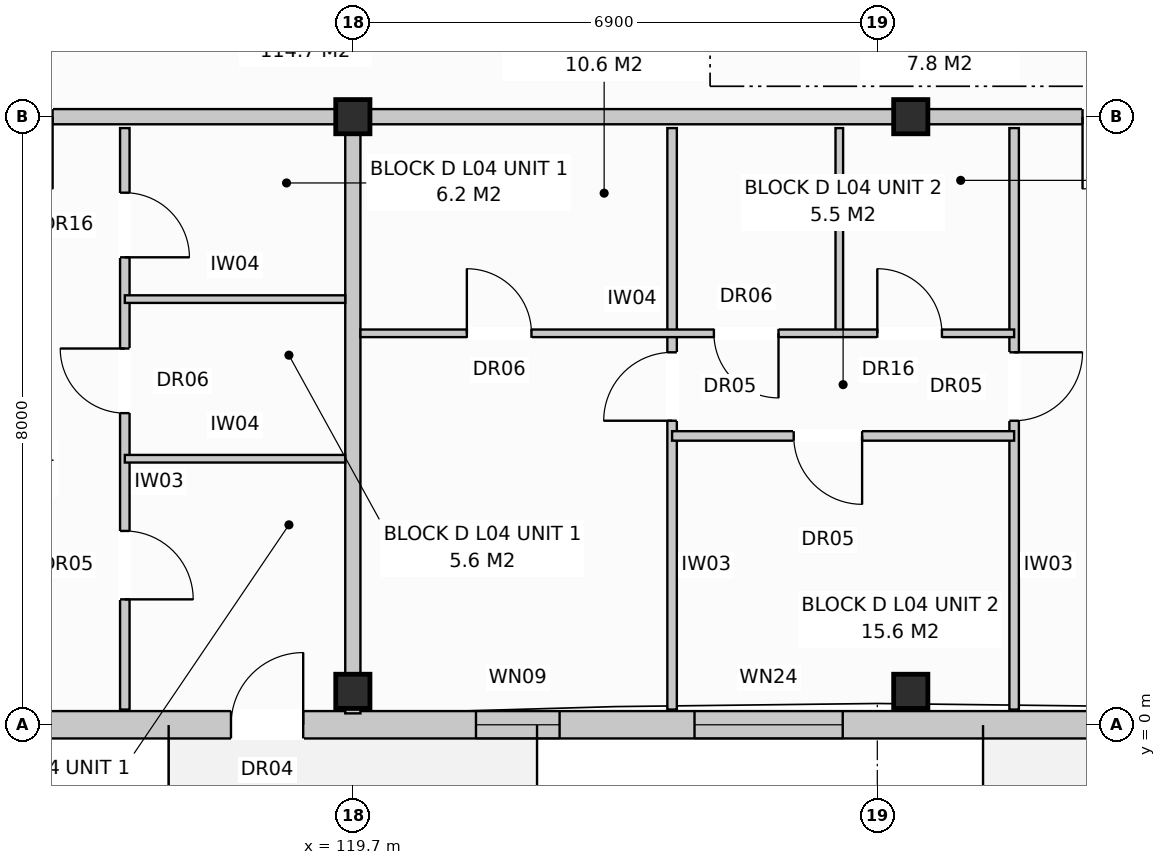
"""IFC4 building model, lengths in metres.
Left out: names, types, materials, properties, quantities, classifications, styles, units other than length and angle.
Written with IfcOpenShell. Run it as: python <this file> out.ifc"""

import sys

from ifc_helpers import new_model, si_unit, direction, frame, frame_2d, origin, origin_with_axes, origin_2d, place, context, subcontext, project, spatial, rectangle, extrude, element, fill, save


model = new_model("IFC4")
c1 = context("Model", 3, precision=1e-05, world=origin(), true_north=direction((0.0, 1.0)))
c2 = subcontext(c1, "Body", "Model", "MODEL_VIEW")
j1 = project(units=[si_unit("LENGTHUNIT", "METRE"), si_unit("PLANEANGLEUNIT", "RADIAN")], contexts=[c1])
p1 = place(None, origin())
s1 = spatial("IfcSite", under=j1, at=p1, CompositionType="ELEMENT")
p2 = place(p1, origin())
s2 = spatial("IfcBuilding", under=s1, at=p2, CompositionType="ELEMENT")
p3 = place(p2, frame((0.0, 0.0, 14.4)))
s3 = spatial("IfcBuildingStorey", under=s2, at=p3, CompositionType="ELEMENT", Elevation=14.4)
for number, where, z_axis, x_axis in (
    (1, (119.7, 0.44, 0.0), (0.0, 0.0, 1.0), (1.0, 0.0, 0.0)),
    (2, (119.7, 8.0, 0.0), (0.0, 0.0, 1.0), (1.0, 0.0, 0.0)),
    (3, (127.04, 0.44, 0.0), (0.0, 0.0, 1.0), (1.0, 0.0, 0.0)),
    (4, (127.04, 8.0, 0.0), (0.0, 0.0, 1.0), (1.0, 0.0, 0.0)),
):
    element("IfcColumn", number, at=place(p3, frame(where, z_axis=z_axis, x_axis=x_axis)), inside=s3, PredefinedType="COLUMN", context=c2, shape_type="SweptSolid", body=[
        extrude(rectangle(XDim=0.45, YDim=0.45, at=origin_2d()), origin(), (0.0, 0.0, 1.0), 3.2),
    ])
p4 = place(p3, frame((112.97, 0.0, 0.0), z_axis=(0.0, 0.0, 1.0), x_axis=(1.0, 0.0, 0.0)))
e5 = element("IfcWall", 5, at=p4, inside=s3, PredefinedType="STANDARD", context=c2, shape_type="SweptSolid", body=[
    extrude(rectangle(XDim=54.86, YDim=0.36, at=frame_2d((27.43, 0.0))), origin(), (0.0, 0.0, 1.0), 2.94),
])
p5 = place(p4, frame((5.127, 0.0, 0.0)))
e6 = element("IfcOpeningElement", 6, at=p5, cuts=e5, PredefinedType="OPENING", context=c2, shape_type="SweptSolid", body=[
    extrude(rectangle(XDim=0.95, YDim=2.1, at=frame_2d((0.475, 1.05))), frame((0.0, 0.192, 0.0), z_axis=(0.0, -1.0, 0.0), x_axis=(1.0, 0.0, 0.0)), (0.0, 0.0, 1.0), 0.384),
])
p6 = place(p4, frame((18.9, 0.0, 0.0)))
e7 = element("IfcOpeningElement", 7, at=p6, cuts=e5, PredefinedType="OPENING", context=c2, shape_type="SweptSolid", body=[
    extrude(rectangle(XDim=0.95, YDim=2.1, at=frame_2d((0.475, 1.05))), frame((0.0, 0.192, 0.0), z_axis=(0.0, -1.0, 0.0), x_axis=(1.0, 0.0, 0.0)), (0.0, 0.0, 1.0), 0.384),
])
p7 = place(p4, frame((32.7, 0.0, 0.0)))
e8 = element("IfcOpeningElement", 8, at=p7, cuts=e5, PredefinedType="OPENING", context=c2, shape_type="SweptSolid", body=[
    extrude(rectangle(XDim=0.95, YDim=2.1, at=frame_2d((0.475, 1.05))), frame((0.0, 0.192, 0.0), z_axis=(0.0, -1.0, 0.0), x_axis=(1.0, 0.0, 0.0)), (0.0, 0.0, 1.0), 0.384),
])
p8 = place(p4, frame((44.591, 0.0, 0.0)))
e9 = element("IfcOpeningElement", 9, at=p8, cuts=e5, PredefinedType="OPENING", context=c2, shape_type="SweptSolid", body=[
    extrude(rectangle(XDim=0.95, YDim=2.1, at=frame_2d((0.475, 1.05))), frame((0.0, 0.192, 0.0), z_axis=(0.0, -1.0, 0.0), x_axis=(1.0, 0.0, 0.0)), (0.0, 0.0, 1.0), 0.384),
])
p9 = place(p4, frame((0.9, 0.0, 0.8)))
e10 = element("IfcOpeningElement", 10, at=p9, cuts=e5, PredefinedType="OPENING", context=c2, shape_type="SweptSolid", body=[
    extrude(rectangle(XDim=1.8, YDim=1.7, at=frame_2d((0.9, 0.85))), frame((0.0, 0.192, 0.0), z_axis=(0.0, -1.0, 0.0), x_axis=(1.0, 0.0, 0.0)), (0.0, 0.0, 1.0), 0.384),
])
p10 = place(p4, frame((8.35, 0.0, 0.72)))
e11 = element("IfcOpeningElement", 11, at=p10, cuts=e5, PredefinedType="OPENING", context=c2, shape_type="SweptSolid", body=[
    extrude(rectangle(XDim=1.1, YDim=1.5, at=frame_2d((0.55, 0.75))), frame((0.0, 0.192, 0.0), z_axis=(0.0, -1.0, 0.0), x_axis=(1.0, 0.0, 0.0)), (0.0, 0.0, 1.0), 0.384),
])
p11 = place(p4, frame((11.225, 0.0, 0.8)))
e12 = element("IfcOpeningElement", 12, at=p11, cuts=e5, PredefinedType="OPENING", context=c2, shape_type="SweptSolid", body=[
    extrude(rectangle(XDim=1.95, YDim=1.65, at=frame_2d((0.975, 0.825))), frame((0.0, 0.192, 0.0), z_axis=(0.0, -1.0, 0.0), x_axis=(1.0, 0.0, 0.0)), (0.0, 0.0, 1.0), 0.384),
])
p12 = place(p4, frame((16.8, 0.0, 0.8)))
e13 = element("IfcOpeningElement", 13, at=p12, cuts=e5, PredefinedType="OPENING", context=c2, shape_type="SweptSolid", body=[
    extrude(rectangle(XDim=1.8, YDim=1.7, at=frame_2d((0.9, 0.85))), frame((0.0, 0.192, 0.0), z_axis=(0.0, -1.0, 0.0), x_axis=(1.0, 0.0, 0.0)), (0.0, 0.0, 1.0), 0.384),
])
p13 = place(p4, frame((22.25, 0.0, 0.72)))
e14 = element("IfcOpeningElement", 14, at=p13, cuts=e5, PredefinedType="OPENING", context=c2, shape_type="SweptSolid", body=[
    extrude(rectangle(XDim=1.9, YDim=1.85, at=frame_2d((0.95, 0.925))), frame((0.0, 0.192, 0.0), z_axis=(0.0, -1.0, 0.0), x_axis=(1.0, 0.0, 0.0)), (0.0, 0.0, 1.0), 0.384),
])
p14 = place(p4, frame((28.35, 0.0, 0.72)))
e15 = element("IfcOpeningElement", 15, at=p14, cuts=e5, PredefinedType="OPENING", context=c2, shape_type="SweptSolid", body=[
    extrude(rectangle(XDim=1.1, YDim=1.5, at=frame_2d((0.55, 0.75))), frame((0.0, 0.192, 0.0), z_axis=(0.0, -1.0, 0.0), x_axis=(1.0, 0.0, 0.0)), (0.0, 0.0, 1.0), 0.384),
])
p15 = place(p4, frame((30.6, 0.0, 0.8)))
e16 = element("IfcOpeningElement", 16, at=p15, cuts=e5, PredefinedType="OPENING", context=c2, shape_type="SweptSolid", body=[
    extrude(rectangle(XDim=1.8, YDim=1.7, at=frame_2d((0.9, 0.85))), frame((0.0, 0.192, 0.0), z_axis=(0.0, -1.0, 0.0), x_axis=(1.0, 0.0, 0.0)), (0.0, 0.0, 1.0), 0.384),
])
p16 = place(p4, frame((36.55, 0.0, 0.8)))
e17 = element("IfcOpeningElement", 17, at=p16, cuts=e5, PredefinedType="OPENING", context=c2, shape_type="SweptSolid", body=[
    extrude(rectangle(XDim=1.9, YDim=1.85, at=frame_2d((0.95, 0.925))), frame((0.0, 0.192, 0.0), z_axis=(0.0, -1.0, 0.0), x_axis=(1.0, 0.0, 0.0)), (0.0, 0.0, 1.0), 0.384),
])
p17 = place(p4, frame((42.65, 0.0, 0.72)))
e18 = element("IfcOpeningElement", 18, at=p17, cuts=e5, PredefinedType="OPENING", context=c2, shape_type="SweptSolid", body=[
    extrude(rectangle(XDim=1.1, YDim=1.5, at=frame_2d((0.55, 0.75))), frame((0.0, 0.192, 0.0), z_axis=(0.0, -1.0, 0.0), x_axis=(1.0, 0.0, 0.0)), (0.0, 0.0, 1.0), 0.384),
])
p18 = place(p4, frame((48.7, 0.0, 0.8)))
e19 = element("IfcOpeningElement", 19, at=p18, cuts=e5, PredefinedType="OPENING", context=c2, shape_type="SweptSolid", body=[
    extrude(rectangle(XDim=1.8, YDim=1.7, at=frame_2d((0.9, 0.85))), frame((0.0, 0.192, 0.0), z_axis=(0.0, -1.0, 0.0), x_axis=(1.0, 0.0, 0.0)), (0.0, 0.0, 1.0), 0.384),
])
p19 = place(p4, frame((52.45, 0.0, 0.72)))
e20 = element("IfcOpeningElement", 20, at=p19, cuts=e5, PredefinedType="OPENING", context=c2, shape_type="SweptSolid", body=[
    extrude(rectangle(XDim=1.1, YDim=1.5, at=frame_2d((0.55, 0.75))), frame((0.0, 0.192, 0.0), z_axis=(0.0, -1.0, 0.0), x_axis=(1.0, 0.0, 0.0)), (0.0, 0.0, 1.0), 0.384),
])
p20 = place(p3, frame((119.7, 7.85, 0.0), z_axis=(0.0, 0.0, 1.0), x_axis=(0.0, -1.0, 0.0)))
e21 = element("IfcWall", 21, at=p20, inside=s3, PredefinedType="PARTITIONING", context=c2, shape_type="SweptSolid", body=[
    extrude(rectangle(XDim=7.7, YDim=0.2, at=frame_2d((3.85, 0.0))), origin(), (0.0, 0.0, 1.0), 2.38),
])
p21 = place(p3, frame((112.8, 8.0, 0.0), z_axis=(0.0, 0.0, 1.0), x_axis=(1.0, 0.0, 0.0)))
e22 = element("IfcWall", 22, at=p21, inside=s3, PredefinedType="PARTITIONING", context=c2, shape_type="SweptSolid", body=[
    extrude(rectangle(XDim=6.9, YDim=0.2, at=frame_2d((3.45, 0.0))), origin(), (0.0, 0.0, 1.0), 2.38),
])
p22 = place(p21, frame((2.0, 0.0, 0.0)))
e23 = element("IfcOpeningElement", 23, at=p22, cuts=e22, PredefinedType="OPENING", context=c2, shape_type="SweptSolid", body=[
    extrude(rectangle(XDim=0.95, YDim=2.15, at=frame_2d((0.475, 1.075))), frame((0.0, 0.112, 0.0), z_axis=(0.0, -1.0, 0.0), x_axis=(1.0, 0.0, 0.0)), (0.0, 0.0, 1.0), 0.224),
])
p23 = place(p3, frame((116.7, 7.85, 0.0), z_axis=(0.0, 0.0, 1.0), x_axis=(0.0, -1.0, 0.0)))
e24 = element("IfcWall", 24, at=p23, inside=s3, PredefinedType="PARTITIONING", context=c2, shape_type="SweptSolid", body=[
    extrude(rectangle(XDim=7.65, YDim=0.125, at=frame_2d((3.825, 0.0))), origin(), (0.0, 0.0, 1.0), 2.94),
])
p24 = place(p23, frame((0.85, 0.0, 0.0)))
e25 = element("IfcOpeningElement", 25, at=p24, cuts=e24, PredefinedType="OPENING", context=c2, shape_type="SweptSolid", body=[
    extrude(rectangle(XDim=0.85, YDim=2.1, at=frame_2d((0.425, 1.05))), frame((0.0, 0.074, 0.0), z_axis=(0.0, -1.0, 0.0), x_axis=(1.0, 0.0, 0.0)), (0.0, 0.0, 1.0), 0.149),
])
p25 = place(p23, frame((2.9, 0.0, 0.0)))
e26 = element("IfcOpeningElement", 26, at=p25, cuts=e24, PredefinedType="OPENING", context=c2, shape_type="SweptSolid", body=[
    extrude(rectangle(XDim=0.85, YDim=2.05, at=frame_2d((0.425, 1.025))), frame((0.0, 0.074, 0.0), z_axis=(0.0, -1.0, 0.0), x_axis=(1.0, 0.0, 0.0)), (0.0, 0.0, 1.0), 0.149),
])
p26 = place(p23, frame((5.3, 0.0, 0.0)))
e27 = element("IfcOpeningElement", 27, at=p26, cuts=e24, PredefinedType="OPENING", context=c2, shape_type="SweptSolid", body=[
    extrude(rectangle(XDim=0.9, YDim=2.1, at=frame_2d((0.45, 1.05))), frame((0.0, 0.074, 0.0), z_axis=(0.0, -1.0, 0.0), x_axis=(1.0, 0.0, 0.0)), (0.0, 0.0, 1.0), 0.149),
])
for number, where, z_axis, x_axis in (
    (28, (116.7, 5.6, 0.0), (0.0, 0.0, 1.0), (1.0, 0.0, 0.0)),
    (29, (116.7, 3.5, 0.0), (0.0, 0.0, 1.0), (1.0, 0.0, 0.0)),
):
    element("IfcWall", number, at=place(p3, frame(where, z_axis=z_axis, x_axis=x_axis)), inside=s3, PredefinedType="PARTITIONING", context=c2, shape_type="SweptSolid", body=[
        extrude(rectangle(XDim=2.9, YDim=0.1, at=frame_2d((1.45, 0.0))), origin(), (0.0, 0.0, 1.0), 2.94),
    ])
p27 = place(p3, frame((119.7, 8.0, 0.0), z_axis=(0.0, 0.0, 1.0), x_axis=(1.0, 0.0, 0.0)))
e30 = element("IfcWall", 30, at=p27, inside=s3, PredefinedType="PARTITIONING", context=c2, shape_type="SweptSolid", body=[
    extrude(rectangle(XDim=13.8, YDim=0.2, at=frame_2d((6.9, 0.0))), origin(), (0.0, 0.0, 1.0), 2.38),
])
p28 = place(p27, frame((9.6, 0.0, 0.0)))
e31 = element("IfcOpeningElement", 31, at=p28, cuts=e30, PredefinedType="OPENING", context=c2, shape_type="SweptSolid", body=[
    extrude(rectangle(XDim=0.95, YDim=2.15, at=frame_2d((0.475, 1.075))), frame((0.0, 0.112, 0.0), z_axis=(0.0, -1.0, 0.0), x_axis=(1.0, 0.0, 0.0)), (0.0, 0.0, 1.0), 0.224),
])
p29 = place(p3, frame((128.4, 7.85, 0.0), z_axis=(0.0, 0.0, 1.0), x_axis=(0.0, -1.0, 0.0)))
e32 = element("IfcWall", 32, at=p29, inside=s3, PredefinedType="PARTITIONING", context=c2, shape_type="SweptSolid", body=[
    extrude(rectangle(XDim=7.65, YDim=0.125, at=frame_2d((3.825, 0.0))), origin(), (0.0, 0.0, 1.0), 2.94),
])
p30 = place(p29, frame((2.95, 0.0, 0.0)))
e33 = element("IfcOpeningElement", 33, at=p30, cuts=e32, PredefinedType="OPENING", context=c2, shape_type="SweptSolid", body=[
    extrude(rectangle(XDim=0.9, YDim=2.1, at=frame_2d((0.45, 1.05))), frame((0.0, 0.074, 0.0), z_axis=(0.0, -1.0, 0.0), x_axis=(1.0, 0.0, 0.0)), (0.0, 0.0, 1.0), 0.149),
])
p31 = place(p3, frame((123.9, 7.85, 0.0), z_axis=(0.0, 0.0, 1.0), x_axis=(0.0, -1.0, 0.0)))
e34 = element("IfcWall", 34, at=p31, inside=s3, PredefinedType="PARTITIONING", context=c2, shape_type="SweptSolid", body=[
    extrude(rectangle(XDim=7.65, YDim=0.125, at=frame_2d((3.825, 0.0))), origin(), (0.0, 0.0, 1.0), 2.94),
])
p32 = place(p31, frame((2.95, 0.0, 0.0)))
e35 = element("IfcOpeningElement", 35, at=p32, cuts=e34, PredefinedType="OPENING", context=c2, shape_type="SweptSolid", body=[
    extrude(rectangle(XDim=0.9, YDim=2.1, at=frame_2d((0.45, 1.05))), frame((0.0, 0.074, 0.0), z_axis=(0.0, -1.0, 0.0), x_axis=(1.0, 0.0, 0.0)), (0.0, 0.0, 1.0), 0.149),
])
p33 = place(p3, frame((126.1, 7.85, 0.0), z_axis=(0.0, 0.0, 1.0), x_axis=(0.0, -1.0, 0.0)))
e36 = element("IfcWall", 36, at=p33, inside=s3, PredefinedType="PARTITIONING", context=c2, shape_type="SweptSolid", body=[
    extrude(rectangle(XDim=2.7, YDim=0.1, at=frame_2d((1.35, 0.0))), origin(), (0.0, 0.0, 1.0), 2.94),
])
p34 = place(p3, frame((119.8, 5.15, 0.0), z_axis=(0.0, 0.0, 1.0), x_axis=(1.0, 0.0, 0.0)))
e37 = element("IfcWall", 37, at=p34, inside=s3, PredefinedType="PARTITIONING", context=c2, shape_type="SweptSolid", body=[
    extrude(rectangle(XDim=8.6, YDim=0.1, at=frame_2d((4.3, 0.0))), origin(), (0.0, 0.0, 1.0), 2.94),
])
p35 = place(p34, frame((1.4, 0.0, 0.0)))
e38 = element("IfcOpeningElement", 38, at=p35, cuts=e37, PredefinedType="OPENING", context=c2, shape_type="SweptSolid", body=[
    extrude(rectangle(XDim=0.85, YDim=2.05, at=frame_2d((0.425, 1.025))), frame((0.0, 0.062, 0.0), z_axis=(0.0, -1.0, 0.0), x_axis=(1.0, 0.0, 0.0)), (0.0, 0.0, 1.0), 0.124),
])
p36 = place(p34, frame((4.65, 0.0, 0.0)))
e39 = element("IfcOpeningElement", 39, at=p36, cuts=e37, PredefinedType="OPENING", context=c2, shape_type="SweptSolid", body=[
    extrude(rectangle(XDim=0.85, YDim=2.05, at=frame_2d((0.425, 1.025))), frame((0.0, 0.062, 0.0), z_axis=(0.0, -1.0, 0.0), x_axis=(1.0, 0.0, 0.0)), (0.0, 0.0, 1.0), 0.124),
])
p37 = place(p34, frame((6.8, 0.0, 0.0)))
e40 = element("IfcOpeningElement", 40, at=p37, cuts=e37, PredefinedType="OPENING", context=c2, shape_type="SweptSolid", body=[
    extrude(rectangle(XDim=0.85, YDim=2.1, at=frame_2d((0.425, 1.05))), frame((0.0, 0.062, 0.0), z_axis=(0.0, -1.0, 0.0), x_axis=(1.0, 0.0, 0.0)), (0.0, 0.0, 1.0), 0.124),
])
p38 = place(p3, frame((123.9, 3.8, 0.0), z_axis=(0.0, 0.0, 1.0), x_axis=(1.0, 0.0, 0.0)))
e41 = element("IfcWall", 41, at=p38, inside=s3, PredefinedType="PARTITIONING", context=c2, shape_type="SweptSolid", body=[
    extrude(rectangle(XDim=4.5, YDim=0.125, at=frame_2d((2.25, 0.0))), origin(), (0.0, 0.0, 1.0), 2.94),
])
p39 = place(p38, frame((1.6, 0.0, 0.0)))
e42 = element("IfcOpeningElement", 42, at=p39, cuts=e41, PredefinedType="OPENING", context=c2, shape_type="SweptSolid", body=[
    extrude(rectangle(XDim=0.9, YDim=2.1, at=frame_2d((0.45, 1.05))), frame((0.0, 0.074, 0.0), z_axis=(0.0, -1.0, 0.0), x_axis=(1.0, 0.0, 0.0)), (0.0, 0.0, 1.0), 0.149),
])
p40 = place(p5, origin_with_axes())
e43 = element("IfcDoor", 43, at=p40, inside=s3, OperationType="SINGLE_SWING_RIGHT", PredefinedType="DOOR", context=c2, shape_type="SweptSolid", body=[
    extrude(rectangle(XDim=0.95, YDim=2.1, at=frame_2d((0.475, 1.05))), frame((0.0, 0.025, 0.0), z_axis=(0.0, -1.0, 0.0), x_axis=(1.0, 0.0, 0.0)), (0.0, 0.0, 1.0), 0.05),
])
fill(e6, e43)
p41 = place(p10, origin_with_axes())
e44 = element("IfcWindow", 44, at=p41, inside=s3, PartitioningType="SINGLE_PANEL", PredefinedType="WINDOW", context=c2, shape_type="SweptSolid", body=[
    extrude(rectangle(XDim=1.1, YDim=1.5, at=frame_2d((0.55, 0.75))), frame((0.0, 0.03, 0.0), z_axis=(0.0, -1.0, 0.0), x_axis=(1.0, 0.0, 0.0)), (0.0, 0.0, 1.0), 0.06),
])
fill(e11, e44)
p42 = place(p11, origin_with_axes())
e45 = element("IfcWindow", 45, at=p42, inside=s3, PartitioningType="SINGLE_PANEL", PredefinedType="WINDOW", context=c2, shape_type="SweptSolid", body=[
    extrude(rectangle(XDim=1.95, YDim=1.65, at=frame_2d((0.975, 0.825))), frame((0.0, 0.03, 0.0), z_axis=(0.0, -1.0, 0.0), x_axis=(1.0, 0.0, 0.0)), (0.0, 0.0, 1.0), 0.06),
])
fill(e12, e45)
p43 = place(p24, origin_with_axes())
e46 = element("IfcDoor", 46, at=p43, inside=s3, OperationType="SINGLE_SWING_RIGHT", PredefinedType="DOOR", context=c2, shape_type="SweptSolid", body=[
    extrude(rectangle(XDim=0.85, YDim=2.1, at=frame_2d((0.425, 1.05))), frame((0.0, 0.025, 0.0), z_axis=(0.0, -1.0, 0.0), x_axis=(1.0, 0.0, 0.0)), (0.0, 0.0, 1.0), 0.05),
])
fill(e25, e46)
p44 = place(p25, frame((0.85, 0.0, 0.0), z_axis=(0.0, 0.0, 1.0), x_axis=(-1.0, 0.0, 0.0)))
e47 = element("IfcDoor", 47, at=p44, inside=s3, OperationType="SINGLE_SWING_LEFT", PredefinedType="DOOR", context=c2, shape_type="SweptSolid", body=[
    extrude(rectangle(XDim=0.85, YDim=2.05, at=frame_2d((0.425, 1.025))), frame((0.0, 0.025, 0.0), z_axis=(0.0, -1.0, 0.0), x_axis=(1.0, 0.0, 0.0)), (0.0, 0.0, 1.0), 0.05),
])
fill(e26, e47)
p45 = place(p26, origin_with_axes())
e48 = element("IfcDoor", 48, at=p45, inside=s3, OperationType="SINGLE_SWING_RIGHT", PredefinedType="DOOR", context=c2, shape_type="SweptSolid", body=[
    extrude(rectangle(XDim=0.9, YDim=2.1, at=frame_2d((0.45, 1.05))), frame((0.0, 0.025, 0.0), z_axis=(0.0, -1.0, 0.0), x_axis=(1.0, 0.0, 0.0)), (0.0, 0.0, 1.0), 0.05),
])
fill(e27, e48)
p46 = place(p28, frame((0.95, 0.0, 0.0), z_axis=(0.0, 0.0, 1.0), x_axis=(-1.0, 0.0, 0.0)))
e49 = element("IfcDoor", 49, at=p46, inside=s3, OperationType="SINGLE_SWING_LEFT", PredefinedType="DOOR", context=c2, shape_type="SweptSolid", body=[
    extrude(rectangle(XDim=0.95, YDim=2.15, at=frame_2d((0.475, 1.075))), frame((0.0, 0.025, 0.0), z_axis=(0.0, -1.0, 0.0), x_axis=(1.0, 0.0, 0.0)), (0.0, 0.0, 1.0), 0.05),
])
fill(e31, e49)
p47 = place(p30, origin_with_axes())
e50 = element("IfcDoor", 50, at=p47, inside=s3, OperationType="SINGLE_SWING_LEFT", PredefinedType="DOOR", context=c2, shape_type="SweptSolid", body=[
    extrude(rectangle(XDim=0.9, YDim=2.1, at=frame_2d((0.45, 1.05))), frame((0.0, 0.025, 0.0), z_axis=(0.0, -1.0, 0.0), x_axis=(1.0, 0.0, 0.0)), (0.0, 0.0, 1.0), 0.05),
])
fill(e33, e50)
p48 = place(p32, frame((0.9, 0.0, 0.0), z_axis=(0.0, 0.0, 1.0), x_axis=(-1.0, 0.0, 0.0)))
e51 = element("IfcDoor", 51, at=p48, inside=s3, OperationType="SINGLE_SWING_RIGHT", PredefinedType="DOOR", context=c2, shape_type="SweptSolid", body=[
    extrude(rectangle(XDim=0.9, YDim=2.1, at=frame_2d((0.45, 1.05))), frame((0.0, 0.025, 0.0), z_axis=(0.0, -1.0, 0.0), x_axis=(1.0, 0.0, 0.0)), (0.0, 0.0, 1.0), 0.05),
])
fill(e35, e51)
p49 = place(p35, origin_with_axes())
e52 = element("IfcDoor", 52, at=p49, inside=s3, OperationType="SINGLE_SWING_LEFT", PredefinedType="DOOR", context=c2, shape_type="SweptSolid", body=[
    extrude(rectangle(XDim=0.85, YDim=2.05, at=frame_2d((0.425, 1.025))), frame((0.0, 0.025, 0.0), z_axis=(0.0, -1.0, 0.0), x_axis=(1.0, 0.0, 0.0)), (0.0, 0.0, 1.0), 0.05),
])
fill(e38, e52)
p50 = place(p36, frame((0.85, 0.0, 0.0), z_axis=(0.0, 0.0, 1.0), x_axis=(-1.0, 0.0, 0.0)))
e53 = element("IfcDoor", 53, at=p50, inside=s3, OperationType="SINGLE_SWING_RIGHT", PredefinedType="DOOR", context=c2, shape_type="SweptSolid", body=[
    extrude(rectangle(XDim=0.85, YDim=2.05, at=frame_2d((0.425, 1.025))), frame((0.0, 0.025, 0.0), z_axis=(0.0, -1.0, 0.0), x_axis=(1.0, 0.0, 0.0)), (0.0, 0.0, 1.0), 0.05),
])
fill(e39, e53)
p51 = place(p37, origin_with_axes())
e54 = element("IfcDoor", 54, at=p51, inside=s3, OperationType="SINGLE_SWING_LEFT", PredefinedType="DOOR", context=c2, shape_type="SweptSolid", body=[
    extrude(rectangle(XDim=0.85, YDim=2.1, at=frame_2d((0.425, 1.05))), frame((0.0, 0.025, 0.0), z_axis=(0.0, -1.0, 0.0), x_axis=(1.0, 0.0, 0.0)), (0.0, 0.0, 1.0), 0.05),
])
fill(e40, e54)
p52 = place(p39, frame((0.9, 0.0, 0.0), z_axis=(0.0, 0.0, 1.0), x_axis=(-1.0, 0.0, 0.0)))
e55 = element("IfcDoor", 55, at=p52, inside=s3, OperationType="SINGLE_SWING_RIGHT", PredefinedType="DOOR", context=c2, shape_type="SweptSolid", body=[
    extrude(rectangle(XDim=0.9, YDim=2.1, at=frame_2d((0.45, 1.05))), frame((0.0, 0.025, 0.0), z_axis=(0.0, -1.0, 0.0), x_axis=(1.0, 0.0, 0.0)), (0.0, 0.0, 1.0), 0.05),
])
fill(e42, e55)
save(model, sys.argv[1])
